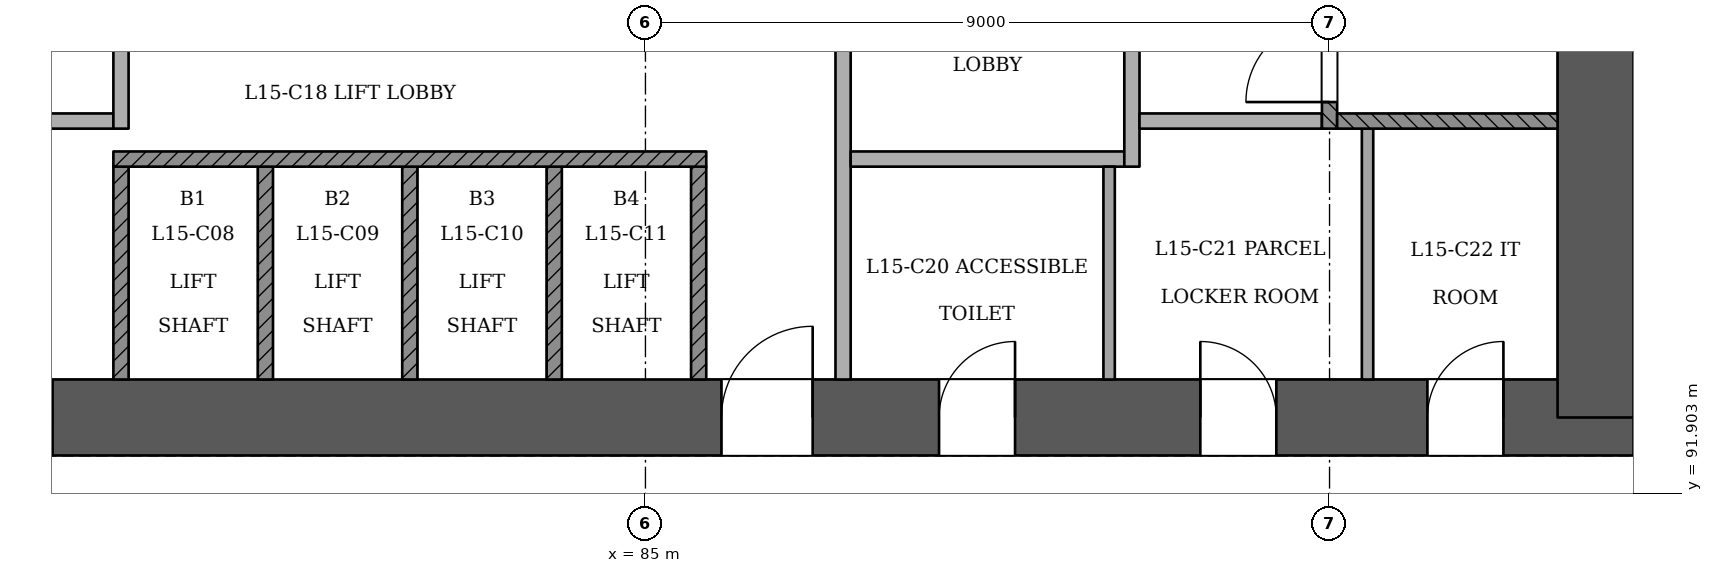
"""IFC4 building model, lengths in metres.
Left out: names, types, materials, properties, quantities, classifications, styles, units other than length and angle.
Written with IfcOpenShell. Run it as: python <this file> out.ifc"""

import sys

from ifc_helpers import new_model, si_unit, direction, frame, frame_2d, origin, place, context, subcontext, project, spatial, rectangle, extrude, element, fill, save


model = new_model("IFC4")
c1 = context("Model", 3, precision=1e-05, world=origin(), true_north=direction((0.0, 1.0)))
c2 = subcontext(c1, "Body", "Model", "MODEL_VIEW")
j1 = project(units=[si_unit("LENGTHUNIT", "METRE"), si_unit("PLANEANGLEUNIT", "RADIAN")], contexts=[c1])
p1 = place(None, origin())
s1 = spatial("IfcSite", under=j1, at=p1, CompositionType="ELEMENT")
p2 = place(p1, origin())
s2 = spatial("IfcBuilding", under=s1, at=p2, CompositionType="ELEMENT")
p3 = place(p2, frame((0.0, 0.0, 63.0)))
s3 = spatial("IfcBuildingStorey", under=s2, at=p3, CompositionType="ELEMENT", Elevation=63.0)
p4 = place(p3, frame((72.5, 92.9, 0.0), z_axis=(0.0, 0.0, 1.0), x_axis=(1.0, 0.0, 0.0)))
e1 = element("IfcWall", 1, at=p4, inside=s3, PredefinedType="SHEAR", context=c2, shape_type="SweptSolid", body=[
    extrude(rectangle(XDim=25.5, YDim=1.0, at=frame_2d((12.75, 0.0))), origin(), (0.0, 0.0, 1.0), 3.6),
])
p5 = place(p4, frame((1.3, 0.0, 0.0)))
e2 = element("IfcOpeningElement", 2, at=p5, cuts=e1, PredefinedType="OPENING", context=c2, shape_type="SweptSolid", body=[
    extrude(rectangle(XDim=1.2, YDim=2.1, at=frame_2d((0.6, 1.05))), frame((0.0, 0.51, 0.0), z_axis=(0.0, -1.0, 0.0), x_axis=(1.0, 0.0, 0.0)), (0.0, 0.0, 1.0), 1.021),
])
p6 = place(p4, frame((3.5, 0.0, 0.0)))
e3 = element("IfcOpeningElement", 3, at=p6, cuts=e1, PredefinedType="OPENING", context=c2, shape_type="SweptSolid", body=[
    extrude(rectangle(XDim=1.2, YDim=2.1, at=frame_2d((0.6, 1.05))), frame((0.0, 0.51, 0.0), z_axis=(0.0, -1.0, 0.0), x_axis=(1.0, 0.0, 0.0)), (0.0, 0.0, 1.0), 1.021),
])
p7 = place(p4, frame((13.5, 0.0, 0.0)))
e4 = element("IfcOpeningElement", 4, at=p7, cuts=e1, PredefinedType="OPENING", context=c2, shape_type="SweptSolid", body=[
    extrude(rectangle(XDim=1.2, YDim=2.1, at=frame_2d((0.6, 1.05))), frame((0.0, 0.51, 0.0), z_axis=(0.0, -1.0, 0.0), x_axis=(1.0, 0.0, 0.0)), (0.0, 0.0, 1.0), 1.021),
])
p8 = place(p4, frame((16.363, 0.0, 0.0)))
e5 = element("IfcOpeningElement", 5, at=p8, cuts=e1, PredefinedType="OPENING", context=c2, shape_type="SweptSolid", body=[
    extrude(rectangle(XDim=1.0, YDim=2.1, at=frame_2d((0.5, 1.05))), frame((0.0, 0.51, 0.0), z_axis=(0.0, -1.0, 0.0), x_axis=(1.0, 0.0, 0.0)), (0.0, 0.0, 1.0), 1.021),
])
p9 = place(p4, frame((19.8, 0.0, 0.0)))
e6 = element("IfcOpeningElement", 6, at=p9, cuts=e1, PredefinedType="OPENING", context=c2, shape_type="SweptSolid", body=[
    extrude(rectangle(XDim=1.0, YDim=2.1, at=frame_2d((0.5, 1.05))), frame((0.0, 0.51, 0.0), z_axis=(0.0, -1.0, 0.0), x_axis=(1.0, 0.0, 0.0)), (0.0, 0.0, 1.0), 1.021),
])
p10 = place(p4, frame((22.788, 0.0, 0.0)))
e7 = element("IfcOpeningElement", 7, at=p10, cuts=e1, PredefinedType="OPENING", context=c2, shape_type="SweptSolid", body=[
    extrude(rectangle(XDim=1.0, YDim=2.1, at=frame_2d((0.5, 1.05))), frame((0.0, 0.51, 0.0), z_axis=(0.0, -1.0, 0.0), x_axis=(1.0, 0.0, 0.0)), (0.0, 0.0, 1.0), 1.021),
])
p11 = place(p3, frame((97.5, 92.9, 0.0), z_axis=(0.0, 0.0, 1.0), x_axis=(0.0, 1.0, 0.0)))
e8 = element("IfcWall", 8, at=p11, inside=s3, PredefinedType="SHEAR", context=c2, shape_type="SweptSolid", body=[
    extrude(rectangle(XDim=11.5, YDim=1.0, at=frame_2d((5.75, 0.0))), origin(), (0.0, 0.0, 1.0), 3.6),
])
p12 = place(p3, frame((62.347, 97.006, 0.0), z_axis=(0.0, 0.0, 1.0), x_axis=(0.500001772576, -0.866024380385, 0.0)))
e9 = element("IfcWall", 9, at=p12, inside=s3, PredefinedType="PARTITIONING", context=c2, shape_type="SweptSolid", body=[
    extrude(rectangle(XDim=43.58, YDim=0.15, at=frame_2d((21.79, 0.0))), origin(), (0.0, 0.0, 1.0), 2.7),
])
p13 = place(p12, frame((3.55, 0.0, 0.0)))
e10 = element("IfcOpeningElement", 10, at=p13, cuts=e9, PredefinedType="OPENING", context=c2, shape_type="SweptSolid", body=[
    extrude(rectangle(XDim=1.2, YDim=2.1, at=frame_2d((0.6, 1.05))), frame((0.0, 0.085, 0.0), z_axis=(0.0, -1.0, 0.0), x_axis=(1.0, 0.0, 0.0)), (0.0, 0.0, 1.0), 0.171),
])
p14 = place(p12, frame((12.19, 0.0, 0.0)))
e11 = element("IfcOpeningElement", 11, at=p14, cuts=e9, PredefinedType="OPENING", context=c2, shape_type="SweptSolid", body=[
    extrude(rectangle(XDim=1.2, YDim=2.1, at=frame_2d((0.6, 1.05))), frame((0.0, 0.085, 0.0), z_axis=(0.0, -1.0, 0.0), x_axis=(1.0, 0.0, 0.0)), (0.0, 0.0, 1.0), 0.171),
])
p15 = place(p12, frame((19.04, 0.0, 0.0)))
e12 = element("IfcOpeningElement", 12, at=p15, cuts=e9, PredefinedType="OPENING", context=c2, shape_type="SweptSolid", body=[
    extrude(rectangle(XDim=1.0, YDim=2.1, at=frame_2d((0.5, 1.05))), frame((0.0, 0.085, 0.0), z_axis=(0.0, -1.0, 0.0), x_axis=(1.0, 0.0, 0.0)), (0.0, 0.0, 1.0), 0.171),
])
p16 = place(p12, frame((27.94, 0.0, 0.0)))
e13 = element("IfcOpeningElement", 13, at=p16, cuts=e9, PredefinedType="OPENING", context=c2, shape_type="SweptSolid", body=[
    extrude(rectangle(XDim=1.2, YDim=2.1, at=frame_2d((0.6, 1.05))), frame((0.0, 0.085, 0.0), z_axis=(0.0, -1.0, 0.0), x_axis=(1.0, 0.0, 0.0)), (0.0, 0.0, 1.0), 0.171),
])
p17 = place(p12, frame((38.831, 0.0, 0.0)))
e14 = element("IfcOpeningElement", 14, at=p17, cuts=e9, PredefinedType="OPENING", context=c2, shape_type="SweptSolid", body=[
    extrude(rectangle(XDim=1.2, YDim=2.1, at=frame_2d((0.6, 1.05))), frame((0.0, 0.085, 0.0), z_axis=(0.0, -1.0, 0.0), x_axis=(1.0, 0.0, 0.0)), (0.0, 0.0, 1.0), 0.171),
])
p18 = place(p3, frame((85.862, 59.265, 0.0), z_axis=(0.0, 0.0, 1.0), x_axis=(0.500001772576, 0.866024380385, 0.0)))
e15 = element("IfcWall", 15, at=p18, inside=s3, PredefinedType="PARTITIONING", context=c2, shape_type="SweptSolid", body=[
    extrude(rectangle(XDim=43.58, YDim=0.15, at=frame_2d((21.79, 0.0))), origin(), (0.0, 0.0, 1.0), 2.7),
])
p19 = place(p18, frame((3.55, 0.0, 0.0)))
e16 = element("IfcOpeningElement", 16, at=p19, cuts=e15, PredefinedType="OPENING", context=c2, shape_type="SweptSolid", body=[
    extrude(rectangle(XDim=1.2, YDim=2.1, at=frame_2d((0.6, 1.05))), frame((0.0, 0.085, 0.0), z_axis=(0.0, -1.0, 0.0), x_axis=(1.0, 0.0, 0.0)), (0.0, 0.0, 1.0), 0.171),
])
p20 = place(p18, frame((14.44, 0.0, 0.0)))
e17 = element("IfcOpeningElement", 17, at=p20, cuts=e15, PredefinedType="OPENING", context=c2, shape_type="SweptSolid", body=[
    extrude(rectangle(XDim=1.2, YDim=2.1, at=frame_2d((0.6, 1.05))), frame((0.0, 0.085, 0.0), z_axis=(0.0, -1.0, 0.0), x_axis=(1.0, 0.0, 0.0)), (0.0, 0.0, 1.0), 0.171),
])
p21 = place(p18, frame((27.94, 0.0, 0.0)))
e18 = element("IfcOpeningElement", 18, at=p21, cuts=e15, PredefinedType="OPENING", context=c2, shape_type="SweptSolid", body=[
    extrude(rectangle(XDim=1.2, YDim=2.1, at=frame_2d((0.6, 1.05))), frame((0.0, 0.085, 0.0), z_axis=(0.0, -1.0, 0.0), x_axis=(1.0, 0.0, 0.0)), (0.0, 0.0, 1.0), 0.171),
])
p22 = place(p18, frame((38.831, 0.0, 0.0)))
e19 = element("IfcOpeningElement", 19, at=p22, cuts=e15, PredefinedType="OPENING", context=c2, shape_type="SweptSolid", body=[
    extrude(rectangle(XDim=1.2, YDim=2.1, at=frame_2d((0.6, 1.05))), frame((0.0, 0.085, 0.0), z_axis=(0.0, -1.0, 0.0), x_axis=(1.0, 0.0, 0.0)), (0.0, 0.0, 1.0), 0.171),
])
for number, where, z_axis, x_axis in (
    (20, (78.1, 93.4, 0.0), (0.0, 0.0, 1.0), (0.0, 1.0, 0.0)),
    (21, (80.0, 93.4, 0.0), (0.0, 0.0, 1.0), (0.0, 1.0, 0.0)),
    (22, (81.9, 93.4, 0.0), (0.0, 0.0, 1.0), (0.0, 1.0, 0.0)),
    (23, (83.8, 93.4, 0.0), (0.0, 0.0, 1.0), (0.0, 1.0, 0.0)),
    (24, (85.7, 93.4, 0.0), (0.0, 0.0, 1.0), (0.0, 1.0, 0.0)),
):
    element("IfcWall", number, at=place(p3, frame(where, z_axis=z_axis, x_axis=x_axis)), inside=s3, PredefinedType="SOLIDWALL", context=c2, shape_type="SweptSolid", body=[
        extrude(rectangle(XDim=2.8, YDim=0.2, at=frame_2d((1.4, 0.0))), origin(), (0.0, 0.0, 1.0), 3.1),
    ])
p23 = place(p3, frame((87.6, 93.4, 0.0), z_axis=(0.0, 0.0, 1.0), x_axis=(0.0, 1.0, 0.0)))
e25 = element("IfcWall", 25, at=p23, inside=s3, PredefinedType="PARTITIONING", context=c2, shape_type="SweptSolid", body=[
    extrude(rectangle(XDim=7.0, YDim=0.2, at=frame_2d((3.5, 0.0))), origin(), (0.0, 0.0, 1.0), 3.1),
])
p24 = place(p23, frame((4.45, 0.0, 0.0)))
e26 = element("IfcOpeningElement", 26, at=p24, cuts=e25, PredefinedType="OPENING", context=c2, shape_type="SweptSolid", body=[
    extrude(rectangle(XDim=1.1, YDim=2.1, at=frame_2d((0.55, 1.05))), frame((0.0, 0.11, 0.0), z_axis=(0.0, -1.0, 0.0), x_axis=(1.0, 0.0, 0.0)), (0.0, 0.0, 1.0), 0.221),
])
p25 = place(p3, frame((91.1, 93.4, 0.0), z_axis=(0.0, 0.0, 1.0), x_axis=(0.0, 1.0, 0.0)))
e27 = element("IfcWall", 27, at=p25, inside=s3, PredefinedType="PARTITIONING", context=c2, shape_type="SweptSolid", body=[
    extrude(rectangle(XDim=2.8, YDim=0.15, at=frame_2d((1.4, 0.0))), origin(), (0.0, 0.0, 1.0), 3.1),
])
p26 = place(p3, frame((94.5, 93.4, 0.0), z_axis=(0.0, 0.0, 1.0), x_axis=(0.0, 1.0, 0.0)))
e28 = element("IfcWall", 28, at=p26, inside=s3, PredefinedType="PARTITIONING", context=c2, shape_type="SweptSolid", body=[
    extrude(rectangle(XDim=3.3, YDim=0.15, at=frame_2d((1.65, 0.0))), origin(), (0.0, 0.0, 1.0), 3.1),
])
p27 = place(p3, frame((78.0, 96.3, 0.0), z_axis=(0.0, 0.0, 1.0), x_axis=(1.0, 0.0, 0.0)))
e29 = element("IfcWall", 29, at=p27, inside=s3, PredefinedType="SOLIDWALL", context=c2, shape_type="SweptSolid", body=[
    extrude(rectangle(XDim=7.8, YDim=0.2, at=frame_2d((3.9, 0.0))), origin(), (0.0, 0.0, 1.0), 3.1),
])
p28 = place(p3, frame((87.7, 96.3, 0.0), z_axis=(0.0, 0.0, 1.0), x_axis=(1.0, 0.0, 0.0)))
e30 = element("IfcWall", 30, at=p28, inside=s3, PredefinedType="PARTITIONING", context=c2, shape_type="SweptSolid", body=[
    extrude(rectangle(XDim=3.6, YDim=0.2, at=frame_2d((1.8, 0.0))), origin(), (0.0, 0.0, 1.0), 3.1),
])
p29 = place(p3, frame((91.4, 96.2, 0.0), z_axis=(0.0, 0.0, 1.0), x_axis=(0.0, 1.0, 0.0)))
e31 = element("IfcWall", 31, at=p29, inside=s3, PredefinedType="PARTITIONING", context=c2, shape_type="SweptSolid", body=[
    extrude(rectangle(XDim=4.2, YDim=0.2, at=frame_2d((2.1, 0.0))), origin(), (0.0, 0.0, 1.0), 3.1),
])
p30 = place(p29, frame((2.45, 0.0, 0.0)))
e32 = element("IfcOpeningElement", 32, at=p30, cuts=e31, PredefinedType="OPENING", context=c2, shape_type="SweptSolid", body=[
    extrude(rectangle(XDim=1.1, YDim=2.1, at=frame_2d((0.55, 1.05))), frame((0.0, 0.11, 0.0), z_axis=(0.0, -1.0, 0.0), x_axis=(1.0, 0.0, 0.0)), (0.0, 0.0, 1.0), 0.221),
])
p31 = place(p3, frame((76.1, 96.8, 0.0), z_axis=(0.0, 0.0, 1.0), x_axis=(1.0, 0.0, 0.0)))
e33 = element("IfcWall", 33, at=p31, inside=s3, PredefinedType="PARTITIONING", context=c2, shape_type="SweptSolid", body=[
    extrude(rectangle(XDim=1.9, YDim=0.2, at=frame_2d((0.95, 0.0))), origin(), (0.0, 0.0, 1.0), 3.1),
])
p32 = place(p3, frame((78.1, 96.7, 0.0), z_axis=(0.0, 0.0, 1.0), x_axis=(0.0, 1.0, 0.0)))
e34 = element("IfcWall", 34, at=p32, inside=s3, PredefinedType="PARTITIONING", context=c2, shape_type="SweptSolid", body=[
    extrude(rectangle(XDim=3.7, YDim=0.2, at=frame_2d((1.85, 0.0))), origin(), (0.0, 0.0, 1.0), 3.1),
])
p33 = place(p32, frame((1.95, 0.0, 0.0)))
e35 = element("IfcOpeningElement", 35, at=p33, cuts=e34, PredefinedType="OPENING", context=c2, shape_type="SweptSolid", body=[
    extrude(rectangle(XDim=1.1, YDim=2.1, at=frame_2d((0.55, 1.05))), frame((0.0, 0.11, 0.0), z_axis=(0.0, -1.0, 0.0), x_axis=(1.0, 0.0, 0.0)), (0.0, 0.0, 1.0), 0.221),
])
p34 = place(p3, frame((91.5, 96.8, 0.0), z_axis=(0.0, 0.0, 1.0), x_axis=(1.0, 0.0, 0.0)))
e36 = element("IfcWall", 36, at=p34, inside=s3, PredefinedType="PARTITIONING", context=c2, shape_type="SweptSolid", body=[
    extrude(rectangle(XDim=2.4, YDim=0.2, at=frame_2d((1.2, 0.0))), origin(), (0.0, 0.0, 1.0), 3.1),
])
p35 = place(p3, frame((94.0, 96.7, 0.0), z_axis=(0.0, 0.0, 1.0), x_axis=(0.0, 1.0, 0.0)))
e37 = element("IfcWall", 37, at=p35, inside=s3, PredefinedType="SOLIDWALL", context=c2, shape_type="SweptSolid", body=[
    extrude(rectangle(XDim=3.7, YDim=0.2, at=frame_2d((1.85, 0.0))), origin(), (0.0, 0.0, 1.0), 3.1),
])
p36 = place(p35, frame((0.35, 0.0, 0.0)))
e38 = element("IfcOpeningElement", 38, at=p36, cuts=e37, PredefinedType="OPENING", context=c2, shape_type="SweptSolid", body=[
    extrude(rectangle(XDim=1.1, YDim=2.1, at=frame_2d((0.55, 1.05))), frame((0.0, 0.11, 0.0), z_axis=(0.0, -1.0, 0.0), x_axis=(1.0, 0.0, 0.0)), (0.0, 0.0, 1.0), 0.221),
])
p37 = place(p3, frame((94.1, 96.8, 0.0), z_axis=(0.0, 0.0, 1.0), x_axis=(1.0, 0.0, 0.0)))
e39 = element("IfcWall", 39, at=p37, inside=s3, PredefinedType="SOLIDWALL", context=c2, shape_type="SweptSolid", body=[
    extrude(rectangle(XDim=2.9, YDim=0.2, at=frame_2d((1.45, 0.0))), origin(), (0.0, 0.0, 1.0), 3.1),
])
p38 = place(p36, origin())
e40 = element("IfcDoor", 40, at=p38, inside=s3, OperationType="SINGLE_SWING_LEFT", PredefinedType="NOTDEFINED", context=c2, shape_type="SweptSolid", body=[
    extrude(rectangle(XDim=1.1, YDim=2.1, at=frame_2d((0.55, 1.05))), frame((0.0, 0.025, 0.0), z_axis=(0.0, -1.0, 0.0), x_axis=(1.0, 0.0, 0.0)), (0.0, 0.0, 1.0), 0.05),
])
fill(e38, e40)
p39 = place(p6, origin())
e41 = element("IfcDoor", 41, at=p39, inside=s3, OperationType="SINGLE_SWING_LEFT", PredefinedType="NOTDEFINED", context=c2, shape_type="SweptSolid", body=[
    extrude(rectangle(XDim=1.2, YDim=2.1, at=frame_2d((0.6, 1.05))), frame((0.0, 0.025, 0.0), z_axis=(0.0, -1.0, 0.0), x_axis=(1.0, 0.0, 0.0)), (0.0, 0.0, 1.0), 0.05),
])
fill(e3, e41)
p40 = place(p7, origin())
e42 = element("IfcDoor", 42, at=p40, inside=s3, OperationType="SINGLE_SWING_RIGHT", PredefinedType="NOTDEFINED", context=c2, shape_type="SweptSolid", body=[
    extrude(rectangle(XDim=1.2, YDim=2.1, at=frame_2d((0.6, 1.05))), frame((0.0, 0.025, 0.0), z_axis=(0.0, -1.0, 0.0), x_axis=(1.0, 0.0, 0.0)), (0.0, 0.0, 1.0), 0.05),
])
fill(e4, e42)
p41 = place(p8, origin())
e43 = element("IfcDoor", 43, at=p41, inside=s3, OperationType="SINGLE_SWING_RIGHT", PredefinedType="NOTDEFINED", context=c2, shape_type="SweptSolid", body=[
    extrude(rectangle(XDim=1.0, YDim=2.1, at=frame_2d((0.5, 1.05))), frame((0.0, 0.025, 0.0), z_axis=(0.0, -1.0, 0.0), x_axis=(1.0, 0.0, 0.0)), (0.0, 0.0, 1.0), 0.05),
])
fill(e5, e43)
p42 = place(p9, origin())
e44 = element("IfcDoor", 44, at=p42, inside=s3, OperationType="SINGLE_SWING_LEFT", PredefinedType="NOTDEFINED", context=c2, shape_type="SweptSolid", body=[
    extrude(rectangle(XDim=1.0, YDim=2.1, at=frame_2d((0.5, 1.05))), frame((0.0, 0.025, 0.0), z_axis=(0.0, -1.0, 0.0), x_axis=(1.0, 0.0, 0.0)), (0.0, 0.0, 1.0), 0.05),
])
fill(e6, e44)
p43 = place(p10, origin())
e45 = element("IfcDoor", 45, at=p43, inside=s3, OperationType="SINGLE_SWING_RIGHT", PredefinedType="NOTDEFINED", context=c2, shape_type="SweptSolid", body=[
    extrude(rectangle(XDim=1.0, YDim=2.1, at=frame_2d((0.5, 1.05))), frame((0.0, 0.025, 0.0), z_axis=(0.0, -1.0, 0.0), x_axis=(1.0, 0.0, 0.0)), (0.0, 0.0, 1.0), 0.05),
])
fill(e7, e45)
save(model, sys.argv[1])
